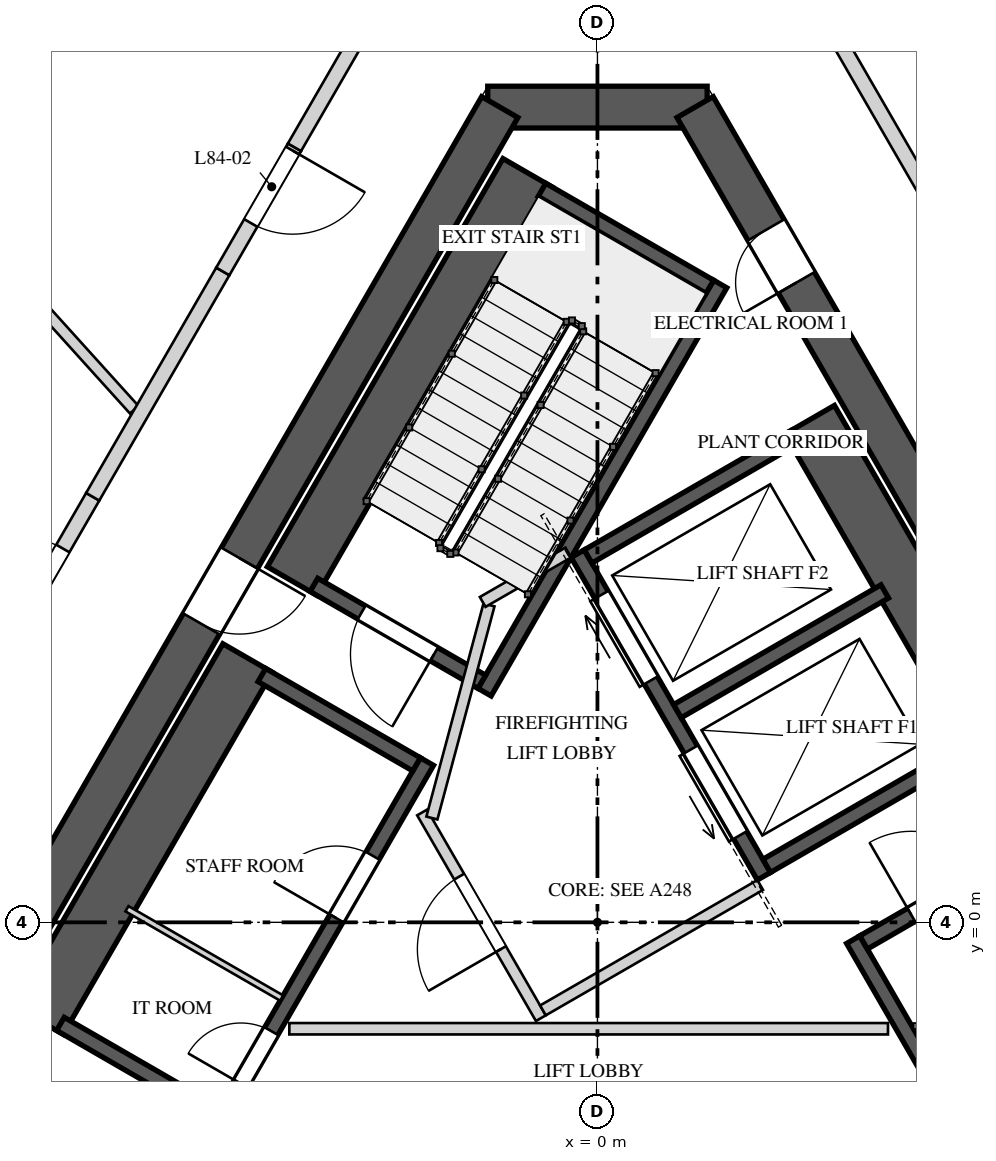
"""IFC4 building model, lengths in metres.
Left out: names, types, materials, properties, quantities, classifications, styles, units other than length and angle.
Written with IfcOpenShell. Run it as: python <this file> out.ifc"""

import sys

from ifc_helpers import new_model, si_unit, direction, frame, frame_2d, origin, place, context, subcontext, project, spatial, polyline, rectangle, outline, extrude, element, fill, save


model = new_model("IFC4")
c1 = context("Model", 3, precision=1e-05, world=origin(), true_north=direction((0.0, 1.0)))
c2 = subcontext(c1, "Body", "Model", "MODEL_VIEW")
j1 = project(units=[si_unit("LENGTHUNIT", "METRE"), si_unit("PLANEANGLEUNIT", "RADIAN")], contexts=[c1])
p1 = place(None, origin())
s1 = spatial("IfcSite", under=j1, at=p1, CompositionType="ELEMENT")
p2 = place(p1, origin())
s2 = spatial("IfcBuilding", under=s1, at=p2, CompositionType="ELEMENT")
p3 = place(p2, frame((0.0, 0.0, 365.9)))
s3 = spatial("IfcBuildingStorey", under=s2, at=p3, CompositionType="ELEMENT", Elevation=365.9)
p4 = place(p3, frame((1.443, 10.725, 0.0), z_axis=(0.0, 0.0, 1.0), x_axis=(-1.0, 0.0, 0.0)))
e1 = element("IfcWall", 1, at=p4, inside=s3, PredefinedType="SHEAR", context=c2, shape_type="SweptSolid", body=[
    extrude(rectangle(XDim=2.887, YDim=0.55, at=frame_2d((1.443, 0.0))), origin(), (0.0, 0.0, 1.0), 4.5),
])
p5 = place(p3, frame((-1.285, 10.725, 0.0), z_axis=(0.0, 0.0, 1.0), x_axis=(-0.499994590896, -0.86602852671, 0.0)))
e2 = element("IfcWall", 2, at=p5, inside=s3, PredefinedType="SHEAR", context=c2, shape_type="SweptSolid", body=[
    extrude(rectangle(XDim=17.292, YDim=0.55, at=frame_2d((8.646, 0.0))), origin(), (0.0, 0.0, 1.0), 4.5),
])
p6 = place(p5, frame((6.851, 0.0, 0.0)))
e3 = element("IfcOpeningElement", 3, at=p6, cuts=e2, PredefinedType="OPENING", context=c2, shape_type="SweptSolid", body=[
    extrude(rectangle(XDim=1.0, YDim=2.4, at=frame_2d((0.5, 1.2))), frame((0.0, 0.285, 0.0), z_axis=(0.0, -1.0, 0.0), x_axis=(1.0, 0.0, 0.0)), (0.0, 0.0, 1.0), 0.57),
])
p7 = place(p3, frame((9.93, -4.25, 0.0), z_axis=(0.0, 0.0, 1.0), x_axis=(-0.499994590896, 0.86602852671, 0.0)))
e4 = element("IfcWall", 4, at=p7, inside=s3, PredefinedType="SHEAR", context=c2, shape_type="SweptSolid", body=[
    extrude(rectangle(XDim=17.292, YDim=0.55, at=frame_2d((8.646, 0.0))), origin(), (0.0, 0.0, 1.0), 4.5),
])
p8 = place(p7, frame((6.921, 0.0, 0.0)))
e5 = element("IfcOpeningElement", 5, at=p8, cuts=e4, PredefinedType="OPENING", context=c2, shape_type="SweptSolid", body=[
    extrude(rectangle(XDim=1.0, YDim=2.4, at=frame_2d((0.5, 1.2))), frame((0.0, 0.285, 0.0), z_axis=(0.0, -1.0, 0.0), x_axis=(1.0, 0.0, 0.0)), (0.0, 0.0, 1.0), 0.57),
])
p9 = place(p7, frame((14.626, 0.0, 0.0)))
e6 = element("IfcOpeningElement", 6, at=p9, cuts=e4, PredefinedType="OPENING", context=c2, shape_type="SweptSolid", body=[
    extrude(rectangle(XDim=0.8, YDim=2.1, at=frame_2d((0.4, 1.05))), frame((0.0, 0.285, 0.0), z_axis=(0.0, -1.0, 0.0), x_axis=(1.0, 0.0, 0.0)), (0.0, 0.0, 1.0), 0.57),
])
p10 = place(p3, frame((-0.918, 9.86, 0.0), z_axis=(0.0, 0.0, 1.0), x_axis=(-0.500026960575, -0.86600983753, 0.0)))
e7 = element("IfcWall", 7, at=p10, inside=s3, PredefinedType="SOLIDWALL", context=c2, shape_type="SweptSolid", body=[
    extrude(rectangle(XDim=6.2, YDim=0.75, at=frame_2d((3.1, 0.0))), origin(), (0.0, 0.0, 1.0), 4.15),
])
p11 = place(p3, frame((1.615, 8.397, 0.0), z_axis=(0.0, 0.0, 1.0), x_axis=(-0.500009909098, -0.866019682689, 0.0)))
e8 = element("IfcWall", 8, at=p11, inside=s3, PredefinedType="SOLIDWALL", context=c2, shape_type="SweptSolid", body=[
    extrude(rectangle(XDim=6.2, YDim=0.2, at=frame_2d((3.1, 0.0))), origin(), (0.0, 0.0, 1.0), 4.15),
])
p12 = place(p3, frame((1.479, 8.361, 0.0), z_axis=(0.0, 0.0, 1.0), x_axis=(-0.865989465428, 0.500062241894, 0.0)))
e9 = element("IfcWall", 9, at=p12, inside=s3, PredefinedType="SOLIDWALL", context=c2, shape_type="SweptSolid", body=[
    extrude(rectangle(XDim=2.55, YDim=0.2, at=frame_2d((1.275, 0.0))), origin(), (0.0, 0.0, 1.0), 4.15),
])
p13 = place(p3, frame((-1.521, 3.165, 0.0), z_axis=(0.0, 0.0, 1.0), x_axis=(-0.866030925526, 0.499990435942, 0.0)))
e10 = element("IfcWall", 10, at=p13, inside=s3, PredefinedType="SOLIDWALL", context=c2, shape_type="SweptSolid", body=[
    extrude(rectangle(XDim=2.55, YDim=0.2, at=frame_2d((1.275, 0.0))), origin(), (0.0, 0.0, 1.0), 4.15),
])
p14 = place(p13, frame((0.725, 0.0, 0.0)))
e11 = element("IfcOpeningElement", 11, at=p14, cuts=e10, PredefinedType="OPENING", context=c2, shape_type="SweptSolid", body=[
    extrude(rectangle(XDim=1.1, YDim=2.4, at=frame_2d((0.55, 1.2))), frame((0.0, 0.11, 0.0), z_axis=(0.0, -1.0, 0.0), x_axis=(1.0, 0.0, 0.0)), (0.0, 0.0, 1.0), 0.22),
])
p15 = place(p3, frame((6.465, -5.597, 0.0), z_axis=(0.0, 0.0, 1.0), x_axis=(-0.49998037582, 0.866036733513, 0.0)))
e12 = element("IfcWall", 12, at=p15, inside=s3, PredefinedType="SOLIDWALL", context=c2, shape_type="SweptSolid", body=[
    extrude(rectangle(XDim=6.2, YDim=0.2, at=frame_2d((3.1, 0.0))), origin(), (0.0, 0.0, 1.0), 4.15),
])
p16 = place(p3, frame((3.501, -0.265, 0.0), z_axis=(0.0, 0.0, 1.0), x_axis=(0.866030925526, 0.499990435942, 0.0)))
e13 = element("IfcWall", 13, at=p16, inside=s3, PredefinedType="SOLIDWALL", context=c2, shape_type="SweptSolid", body=[
    extrude(rectangle(XDim=2.55, YDim=0.2, at=frame_2d((1.275, 0.0))), origin(), (0.0, 0.0, 1.0), 4.15),
])
p17 = place(p16, frame((0.725, 0.0, 0.0)))
e14 = element("IfcOpeningElement", 14, at=p17, cuts=e13, PredefinedType="OPENING", context=c2, shape_type="SweptSolid", body=[
    extrude(rectangle(XDim=1.1, YDim=2.4, at=frame_2d((0.55, 1.2))), frame((0.0, 0.11, 0.0), z_axis=(0.0, -1.0, 0.0), x_axis=(1.0, 0.0, 0.0)), (0.0, 0.0, 1.0), 0.22),
])
p18 = place(p3, frame((-4.993, -2.648, 0.0), z_axis=(0.0, 0.0, 1.0), x_axis=(0.499996545922, 0.866027397988, 0.0)))
e15 = element("IfcWall", 15, at=p18, inside=s3, PredefinedType="SOLIDWALL", context=c2, shape_type="SweptSolid", body=[
    extrude(rectangle(XDim=5.5, YDim=0.2, at=frame_2d((2.75, 0.0))), origin(), (0.0, 0.0, 1.0), 4.15),
])
p19 = place(p18, frame((3.12, 0.0, 0.0)))
e16 = element("IfcOpeningElement", 16, at=p19, cuts=e15, PredefinedType="OPENING", context=c2, shape_type="SweptSolid", body=[
    extrude(rectangle(XDim=0.95, YDim=2.4, at=frame_2d((0.475, 1.2))), frame((0.0, 0.11, 0.0), z_axis=(0.0, -1.0, 0.0), x_axis=(1.0, 0.0, 0.0)), (0.0, 0.0, 1.0), 0.22),
])
p20 = place(p18, frame((0.605, 0.0, 0.0)))
e17 = element("IfcOpeningElement", 17, at=p20, cuts=e15, PredefinedType="OPENING", context=c2, shape_type="SweptSolid", body=[
    extrude(rectangle(XDim=0.8, YDim=2.1, at=frame_2d((0.4, 1.05))), frame((0.0, 0.11, 0.0), z_axis=(0.0, -1.0, 0.0), x_axis=(1.0, 0.0, 0.0)), (0.0, 0.0, 1.0), 0.22),
])
p21 = place(p3, frame((-4.603, 3.477, 0.0), z_axis=(0.0, 0.0, 1.0), x_axis=(-0.500015767406, -0.866016300277, 0.0)))
e18 = element("IfcWall", 18, at=p21, inside=s3, PredefinedType="SOLIDWALL", context=c2, shape_type="SweptSolid", body=[
    extrude(rectangle(XDim=5.5, YDim=0.75, at=frame_2d((2.75, 0.0))), origin(), (0.0, 0.0, 1.0), 4.15),
])
p22 = place(p3, frame((-2.38, 2.078, 0.0), z_axis=(0.0, 0.0, 1.0), x_axis=(-0.866061024631, 0.499938297808, 0.0)))
e19 = element("IfcWall", 19, at=p22, inside=s3, PredefinedType="SOLIDWALL", context=c2, shape_type="SweptSolid", body=[
    extrude(rectangle(XDim=2.35, YDim=0.2, at=frame_2d((1.175, 0.0))), origin(), (0.0, 0.0, 1.0), 4.15),
])
p23 = place(p3, frame((-5.03, -2.512, 0.0), z_axis=(0.0, 0.0, 1.0), x_axis=(-0.866016039709, 0.500016218704, 0.0)))
e20 = element("IfcWall", 20, at=p23, inside=s3, PredefinedType="SOLIDWALL", context=c2, shape_type="SweptSolid", body=[
    extrude(rectangle(XDim=2.35, YDim=0.2, at=frame_2d((1.175, 0.0))), origin(), (0.0, 0.0, 1.0), 4.15),
])
p24 = place(p3, frame((-4.155, -0.996, 0.0), z_axis=(0.0, 0.0, 1.0), x_axis=(-0.866016039709, 0.500016218704, 0.0)))
e21 = element("IfcWall", 21, at=p24, inside=s3, PredefinedType="PARTITIONING", context=c2, shape_type="SweptSolid", body=[
    extrude(rectangle(XDim=2.35, YDim=0.08, at=frame_2d((1.175, 0.0))), origin(), (0.0, 0.0, 1.0), 4.15),
])
p25 = place(p3, frame((2.19, 0.606, 0.0), z_axis=(0.0, 0.0, 1.0), x_axis=(-0.500002801628, 0.866023786258, 0.0)))
e22 = element("IfcWall", 22, at=p25, inside=s3, PredefinedType="SOLIDWALL", context=c2, shape_type="SweptSolid", body=[
    extrude(rectangle(XDim=4.9, YDim=0.2, at=frame_2d((2.45, 0.0))), origin(), (0.0, 0.0, 1.0), 4.15),
])
p26 = place(p25, frame((0.625, 0.0, 0.0)))
e23 = element("IfcOpeningElement", 23, at=p26, cuts=e22, PredefinedType="OPENING", context=c2, shape_type="SweptSolid", body=[
    extrude(rectangle(XDim=1.3, YDim=2.1, at=frame_2d((0.65, 1.05))), frame((0.0, 0.11, 0.0), z_axis=(0.0, -1.0, 0.0), x_axis=(1.0, 0.0, 0.0)), (0.0, 0.0, 1.0), 0.22),
])
p27 = place(p25, frame((2.975, 0.0, 0.0)))
e24 = element("IfcOpeningElement", 24, at=p27, cuts=e22, PredefinedType="OPENING", context=c2, shape_type="SweptSolid", body=[
    extrude(rectangle(XDim=1.3, YDim=2.1, at=frame_2d((0.65, 1.05))), frame((0.0, 0.11, 0.0), z_axis=(0.0, -1.0, 0.0), x_axis=(1.0, 0.0, 0.0)), (0.0, 0.0, 1.0), 0.22),
])
p28 = place(p3, frame((5.243, 2.369, 0.0), z_axis=(0.0, 0.0, 1.0), x_axis=(-0.500002801628, 0.866023786258, 0.0)))
e25 = element("IfcWall", 25, at=p28, inside=s3, PredefinedType="SOLIDWALL", context=c2, shape_type="SweptSolid", body=[
    extrude(rectangle(XDim=4.9, YDim=0.75, at=frame_2d((2.45, 0.0))), origin(), (0.0, 0.0, 1.0), 4.15),
])
for number, where, z_axis, x_axis in (
    (26, (2.227, 0.743, 0.0), (0.0, 0.0, 1.0), (0.866, 0.5, 0.0)),
    (27, (1.052, 2.778, 0.0), (0.0, 0.0, 1.0), (0.866, 0.5, 0.0)),
    (28, (-0.123, 4.813, 0.0), (0.0, 0.0, 1.0), (0.866, 0.5, 0.0)),
):
    element("IfcWall", number, at=place(p3, frame(where, z_axis=z_axis, x_axis=x_axis)), inside=s3, PredefinedType="SOLIDWALL", context=c2, shape_type="SweptSolid", body=[
        extrude(rectangle(XDim=3.15, YDim=0.2, at=frame_2d((1.575, 0.0))), origin(), (0.0, 0.0, 1.0), 4.15),
    ])
p29 = place(p3, frame((-0.744, -1.261, 0.0), z_axis=(0.0, 0.0, 1.0), x_axis=(-0.500004234368, 0.866022959057, 0.0)))
e29 = element("IfcWall", 29, at=p29, inside=s3, PredefinedType="PARTITIONING", context=c2, shape_type="SweptSolid", body=[
    extrude(rectangle(XDim=3.125, YDim=0.15, at=frame_2d((1.562, 0.0))), origin(), (0.0, 0.0, 1.0), 4.15),
])
p30 = place(p29, frame((1.05, 0.0, 0.0)))
e30 = element("IfcOpeningElement", 30, at=p30, cuts=e29, PredefinedType="OPENING", context=c2, shape_type="SweptSolid", body=[
    extrude(rectangle(XDim=1.1, YDim=2.4, at=frame_2d((0.55, 1.2))), frame((0.0, 0.085, 0.0), z_axis=(0.0, -1.0, 0.0), x_axis=(1.0, 0.0, 0.0)), (0.0, 0.0, 1.0), 0.17),
])
p31 = place(p3, frame((-0.717, -1.159, 0.0), z_axis=(0.0, 0.0, 1.0), x_axis=(0.866008176907, 0.50002983664, 0.0)))
e31 = element("IfcWall", 31, at=p31, inside=s3, PredefinedType="PARTITIONING", context=c2, shape_type="SweptSolid", body=[
    extrude(rectangle(XDim=3.3, YDim=0.15, at=frame_2d((1.65, 0.0))), origin(), (0.0, 0.0, 1.0), 4.15),
])
p32 = place(p3, frame((-2.178, 1.372, 0.0), z_axis=(0.0, 0.0, 1.0), x_axis=(0.258808958833, 0.96592852884, 0.0)))
e32 = element("IfcWall", 32, at=p32, inside=s3, PredefinedType="PARTITIONING", context=c2, shape_type="SweptSolid", body=[
    extrude(rectangle(XDim=2.903, YDim=0.15, at=frame_2d((1.451, 0.0))), origin(), (0.0, 0.0, 1.0), 4.15),
])
p33 = place(p3, frame((-1.51, 4.215, 0.0), z_axis=(0.0, 0.0, 1.0), x_axis=(0.866085525409, 0.49989585183, 0.0)))
e33 = element("IfcWall", 33, at=p33, inside=s3, PredefinedType="PARTITIONING", context=c2, shape_type="SweptSolid", body=[
    extrude(rectangle(XDim=1.3, YDim=0.15, at=frame_2d((0.65, 0.0))), origin(), (0.0, 0.0, 1.0), 4.15),
])
p34 = place(p3, frame((-4.053, -1.4, 0.0), z_axis=(0.0, 0.0, 1.0), x_axis=(1.0, 0.0, 0.0)))
e34 = element("IfcWall", 34, at=p34, inside=s3, PredefinedType="PARTITIONING", context=c2, shape_type="SweptSolid", body=[
    extrude(rectangle(XDim=7.876, YDim=0.15, at=frame_2d((3.938, 0.0))), origin(), (0.0, 0.0, 1.0), 4.15),
])
p35 = place(p3, frame((-6.094, 6.744, 0.0), z_axis=(0.0, 0.0, 1.0), x_axis=(-0.670485503808, 0.741922630187, 0.0)))
e35 = element("IfcWall", 35, at=p35, inside=s3, PredefinedType="PARTITIONING", context=c2, shape_type="SweptSolid", body=[
    extrude(rectangle(XDim=4.723, YDim=0.15, at=frame_2d((2.362, 0.0))), origin(), (0.0, 0.0, 1.0), 4.15),
])
p36 = place(p3, frame((-7.608, 3.922, 0.0), z_axis=(0.0, 0.0, 1.0), x_axis=(0.500017114798, 0.866015522326, 0.0)))
e36 = element("IfcWall", 36, at=p36, inside=s3, PredefinedType="SOLIDWALL", context=c2, shape_type="SweptSolid", body=[
    extrude(outline(polyline([(0.0, 0.0), (1.937, 0.0), (1.936, 3.25), (1.129, 3.25), (1.129, 4.15), (0.0, 4.15), (0.0, 0.0)])), frame((0.0, 0.1, 0.0), z_axis=(0.0, -1.0, 0.0), x_axis=(1.0, 0.0, 0.0)), (0.0, 0.0, 1.0), 0.2),
])
p37 = place(p36, frame((0.05, 0.0, 0.0)))
e37 = element("IfcOpeningElement", 37, at=p37, cuts=e36, PredefinedType="OPENING", context=c2, shape_type="SweptSolid", body=[
    extrude(rectangle(XDim=1.1, YDim=2.4, at=frame_2d((0.55, 1.2))), frame((0.0, 0.11, 0.0), z_axis=(0.0, -1.0, 0.0), x_axis=(1.0, 0.0, 0.0)), (0.0, 0.0, 1.0), 0.22),
])
p38 = place(p3, frame((-6.64, 5.599, 0.0), z_axis=(0.0, 0.0, 1.0), x_axis=(0.499989998285, 0.8660311782, 0.0)))
e38 = element("IfcWall", 38, at=p38, inside=s3, PredefinedType="SOLIDWALL", context=c2, shape_type="SweptSolid", body=[
    extrude(rectangle(XDim=3.423, YDim=0.2, at=frame_2d((1.711, 0.0))), origin(), (0.0, 0.0, 1.0), 4.15),
])
p39 = place(p3, frame((-3.986, 10.197, 0.0), z_axis=(0.0, 0.0, 1.0), x_axis=(-0.500051133576, -0.865995879788, 0.0)))
e39 = element("IfcWall", 39, at=p39, inside=s3, PredefinedType="SOLIDWALL", context=c2, shape_type="SweptSolid", body=[
    extrude(outline(polyline([(0.0, 0.0), (1.886, 0.0), (1.886, 3.45), (1.06, 3.45), (1.06, 4.15), (0.0, 4.15), (0.0, 0.0)])), frame((0.0, 0.1, 0.0), z_axis=(0.0, -1.0, 0.0), x_axis=(1.0, 0.0, 0.0)), (0.0, 0.0, 1.0), 0.2),
])
p40 = place(p39, frame((0.05, 0.0, 0.0)))
e40 = element("IfcOpeningElement", 40, at=p40, cuts=e39, PredefinedType="OPENING", context=c2, shape_type="SweptSolid", body=[
    extrude(rectangle(XDim=1.1, YDim=2.4, at=frame_2d((0.55, 1.2))), frame((0.0, 0.11, 0.0), z_axis=(0.0, -1.0, 0.0), x_axis=(1.0, 0.0, 0.0)), (0.0, 0.0, 1.0), 0.22),
])
p41 = place(p3, frame((-3.986, 10.197, 0.0), z_axis=(0.0, 0.0, 1.0), x_axis=(0.49994741746, 0.8660557602, 0.0)))
e41 = element("IfcWall", 41, at=p41, inside=s3, PredefinedType="SOLIDWALL", context=c2, shape_type="SweptSolid", body=[
    extrude(rectangle(XDim=3.006, YDim=0.2, at=frame_2d((1.503, 0.0))), origin(), (0.0, 0.0, 1.0), 4.15),
])
p42 = place(p3, frame((2.483, 12.8, 0.0), z_axis=(0.0, 0.0, 1.0), x_axis=(0.499982771656, -0.866035350345, 0.0)))
e42 = element("IfcWall", 42, at=p42, inside=s3, PredefinedType="SOLIDWALL", context=c2, shape_type="SweptSolid", body=[
    extrude(rectangle(XDim=4.195, YDim=0.2, at=frame_2d((2.097, 0.0))), origin(), (0.0, 0.0, 1.0), 4.15),
])
p43 = place(p14, origin())
e43 = element("IfcDoor", 43, at=p43, inside=s3, OperationType="SINGLE_SWING_RIGHT", PredefinedType="DOOR", context=c2, shape_type="SweptSolid", body=[
    extrude(rectangle(XDim=1.1, YDim=2.4, at=frame_2d((0.55, 1.2))), frame((0.0, 0.025, 0.0), z_axis=(0.0, -1.0, 0.0), x_axis=(1.0, 0.0, 0.0)), (0.0, 0.0, 1.0), 0.05),
])
fill(e11, e43)
p44 = place(p17, origin())
e44 = element("IfcDoor", 44, at=p44, inside=s3, OperationType="SINGLE_SWING_RIGHT", PredefinedType="DOOR", context=c2, shape_type="SweptSolid", body=[
    extrude(rectangle(XDim=1.1, YDim=2.4, at=frame_2d((0.55, 1.2))), frame((0.0, 0.025, 0.0), z_axis=(0.0, -1.0, 0.0), x_axis=(1.0, 0.0, 0.0)), (0.0, 0.0, 1.0), 0.05),
])
fill(e14, e44)
p45 = place(p19, origin())
e45 = element("IfcDoor", 45, at=p45, inside=s3, OperationType="SINGLE_SWING_LEFT", PredefinedType="DOOR", context=c2, shape_type="SweptSolid", body=[
    extrude(rectangle(XDim=0.95, YDim=2.4, at=frame_2d((0.475, 1.2))), frame((0.0, 0.025, 0.0), z_axis=(0.0, -1.0, 0.0), x_axis=(1.0, 0.0, 0.0)), (0.0, 0.0, 1.0), 0.05),
])
fill(e16, e45)
p46 = place(p20, origin())
e46 = element("IfcDoor", 46, at=p46, inside=s3, OperationType="SINGLE_SWING_RIGHT", PredefinedType="DOOR", context=c2, shape_type="SweptSolid", body=[
    extrude(rectangle(XDim=0.8, YDim=2.1, at=frame_2d((0.4, 1.05))), frame((0.0, 0.025, 0.0), z_axis=(0.0, -1.0, 0.0), x_axis=(1.0, 0.0, 0.0)), (0.0, 0.0, 1.0), 0.05),
])
fill(e17, e46)
p47 = place(p26, origin())
e47 = element("IfcDoor", 47, at=p47, inside=s3, OperationType="SLIDING_TO_LEFT", PredefinedType="DOOR", context=c2, shape_type="SweptSolid", body=[
    extrude(rectangle(XDim=1.3, YDim=2.1, at=frame_2d((0.65, 1.05))), frame((0.0, 0.025, 0.0), z_axis=(0.0, -1.0, 0.0), x_axis=(1.0, 0.0, 0.0)), (0.0, 0.0, 1.0), 0.05),
])
fill(e23, e47)
p48 = place(p27, origin())
e48 = element("IfcDoor", 48, at=p48, inside=s3, OperationType="SLIDING_TO_RIGHT", PredefinedType="DOOR", context=c2, shape_type="SweptSolid", body=[
    extrude(rectangle(XDim=1.3, YDim=2.1, at=frame_2d((0.65, 1.05))), frame((0.0, 0.025, 0.0), z_axis=(0.0, -1.0, 0.0), x_axis=(1.0, 0.0, 0.0)), (0.0, 0.0, 1.0), 0.05),
])
fill(e24, e48)
p49 = place(p30, origin())
e49 = element("IfcDoor", 49, at=p49, inside=s3, OperationType="SINGLE_SWING_LEFT", PredefinedType="DOOR", context=c2, shape_type="SweptSolid", body=[
    extrude(rectangle(XDim=1.1, YDim=2.4, at=frame_2d((0.55, 1.2))), frame((0.0, 0.025, 0.0), z_axis=(0.0, -1.0, 0.0), x_axis=(1.0, 0.0, 0.0)), (0.0, 0.0, 1.0), 0.05),
])
fill(e30, e49)
p50 = place(p6, origin())
e50 = element("IfcDoor", 50, at=p50, inside=s3, OperationType="SINGLE_SWING_RIGHT", PredefinedType="DOOR", context=c2, shape_type="SweptSolid", body=[
    extrude(rectangle(XDim=1.0, YDim=2.4, at=frame_2d((0.5, 1.2))), frame((0.0, 0.025, 0.0), z_axis=(0.0, -1.0, 0.0), x_axis=(1.0, 0.0, 0.0)), (0.0, 0.0, 1.0), 0.05),
])
fill(e3, e50)
p51 = place(p9, origin())
e51 = element("IfcDoor", 51, at=p51, inside=s3, OperationType="SINGLE_SWING_RIGHT", PredefinedType="DOOR", context=c2, shape_type="SweptSolid", body=[
    extrude(rectangle(XDim=0.8, YDim=2.1, at=frame_2d((0.4, 1.05))), frame((0.0, 0.025, 0.0), z_axis=(0.0, -1.0, 0.0), x_axis=(1.0, 0.0, 0.0)), (0.0, 0.0, 1.0), 0.05),
])
fill(e6, e51)
p52 = place(p40, origin())
e52 = element("IfcDoor", 52, at=p52, inside=s3, OperationType="SINGLE_SWING_RIGHT", PredefinedType="DOOR", context=c2, shape_type="SweptSolid", body=[
    extrude(rectangle(XDim=1.1, YDim=2.4, at=frame_2d((0.55, 1.2))), frame((0.0, 0.025, 0.0), z_axis=(0.0, -1.0, 0.0), x_axis=(1.0, 0.0, 0.0)), (0.0, 0.0, 1.0), 0.05),
])
fill(e40, e52)
p53 = place(p37, origin())
e53 = element("IfcDoor", 53, at=p53, inside=s3, OperationType="SINGLE_SWING_LEFT", PredefinedType="DOOR", context=c2, shape_type="SweptSolid", body=[
    extrude(rectangle(XDim=1.1, YDim=2.4, at=frame_2d((0.55, 1.2))), frame((0.0, 0.025, 0.0), z_axis=(0.0, -1.0, 0.0), x_axis=(1.0, 0.0, 0.0)), (0.0, 0.0, 1.0), 0.05),
])
fill(e37, e53)
save(model, sys.argv[1])
